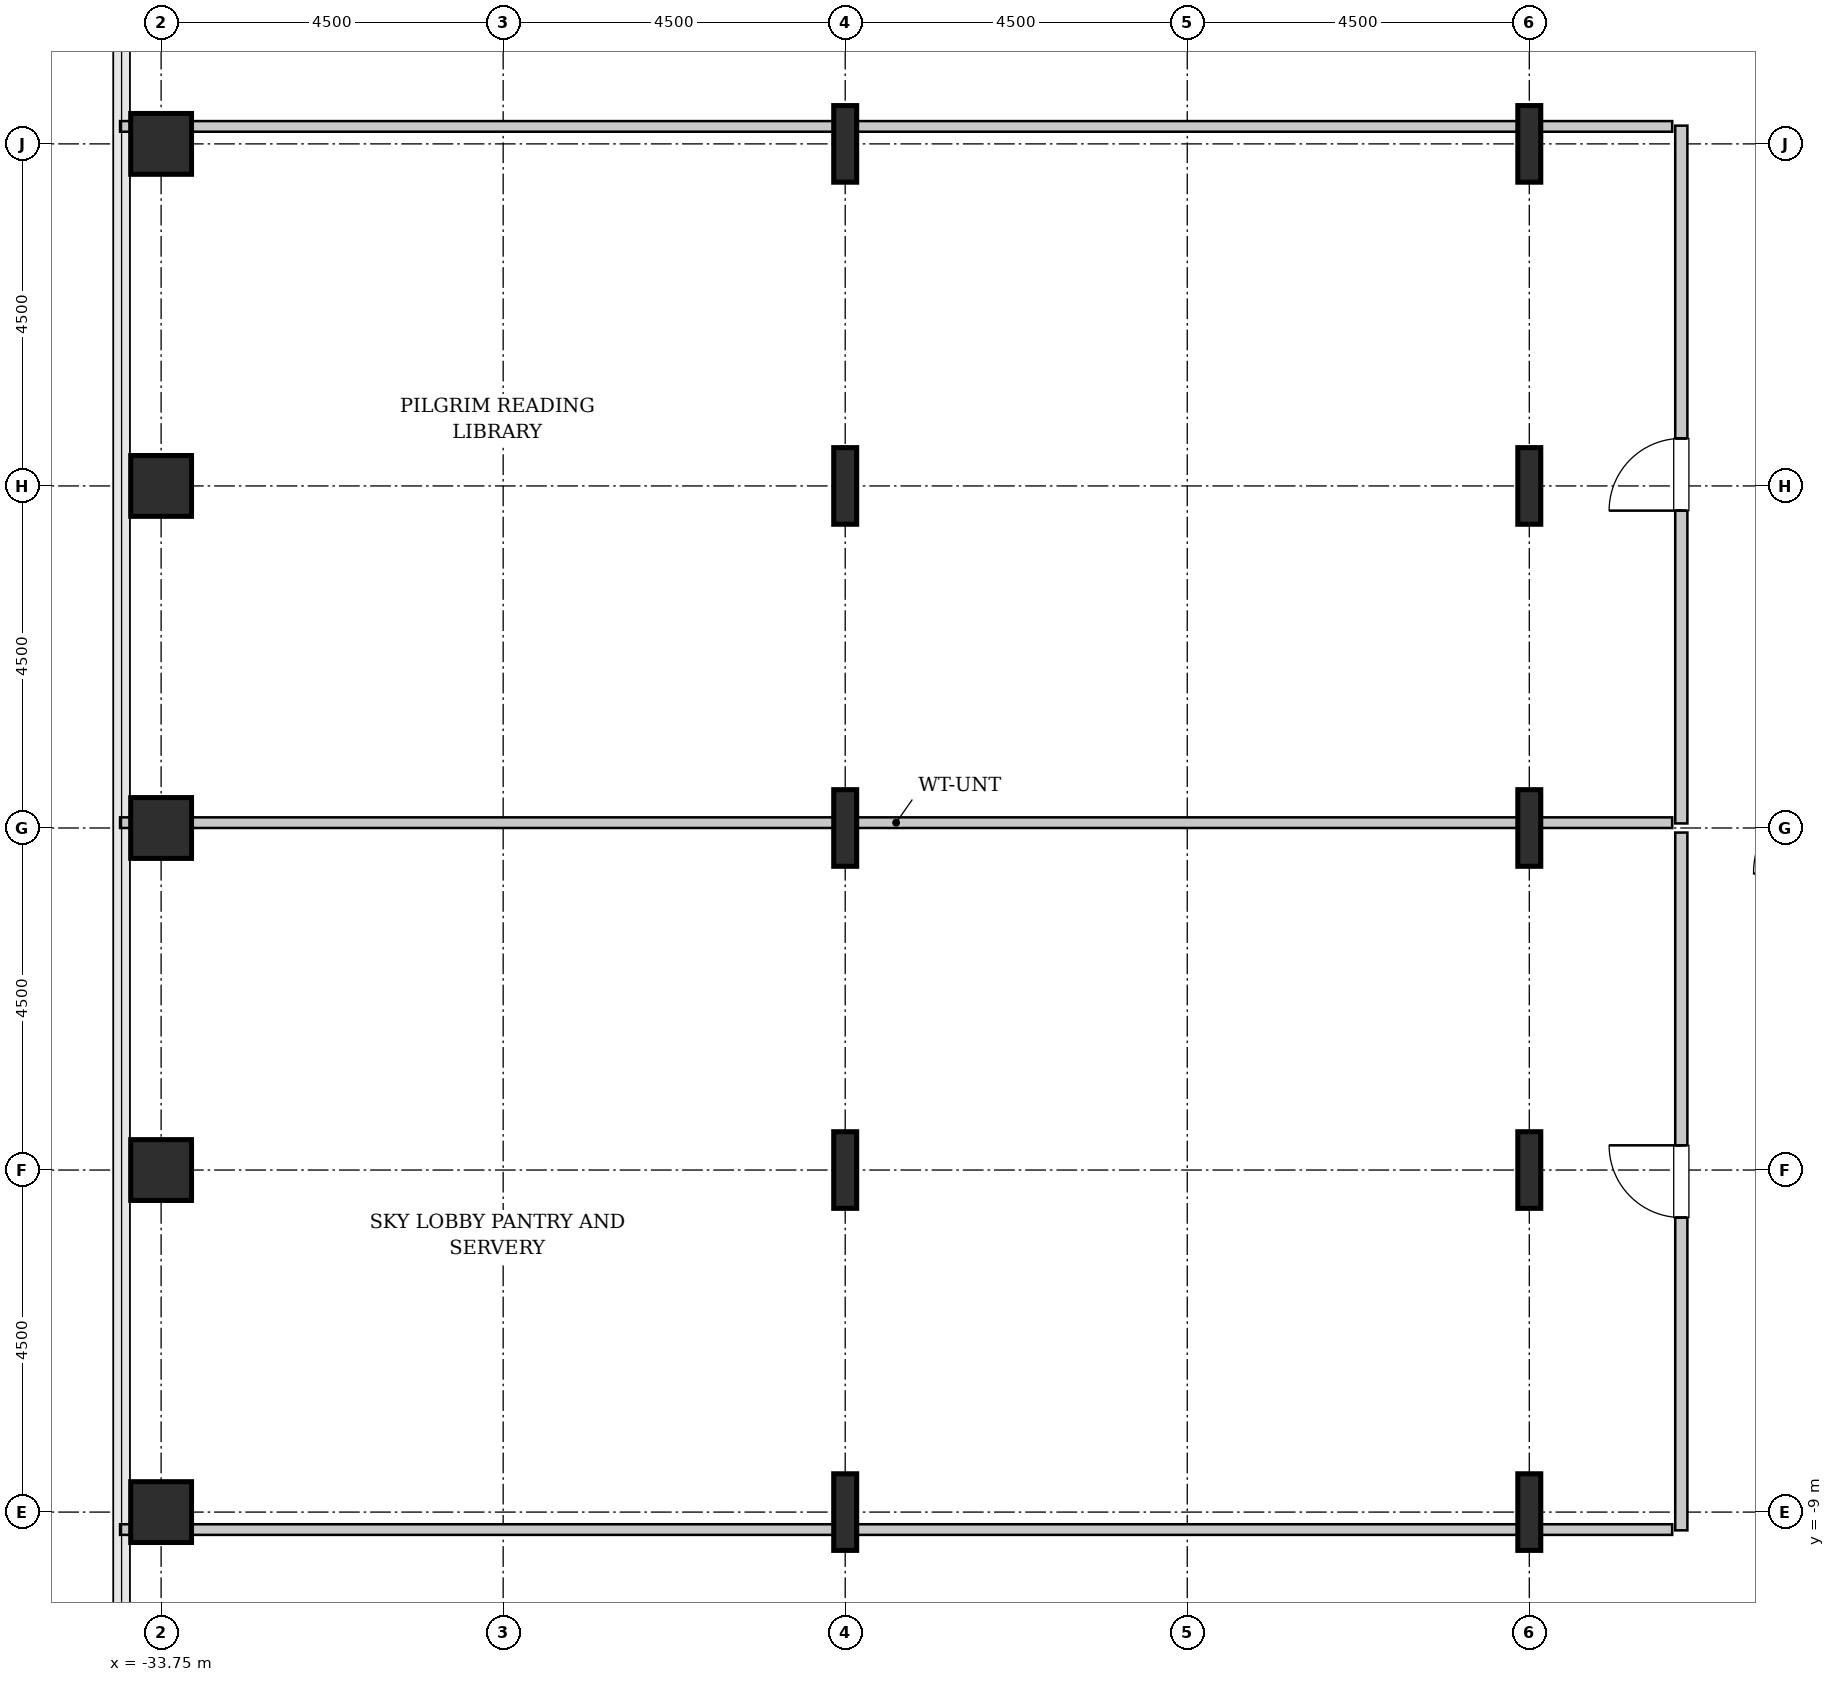
"""IFC4 building model, lengths in metres.
Left out: names, types, materials, properties, quantities, classifications, styles, units other than length and angle.
Written with IfcOpenShell. Run it as: python <this file> out.ifc"""

import sys

from ifc_helpers import new_model, si_unit, direction, frame, frame_2d, origin, origin_2d, place, context, subcontext, project, spatial, rectangle, hollow_rectangle, i_section, extrude, source, transform, mapped, element, fill, save


model = new_model("IFC4")
c1 = context("Model", 3, precision=1e-05, world=origin(), true_north=direction((0.0, 1.0)))
c2 = subcontext(c1, "Body", "Model", "MODEL_VIEW")
j1 = project(units=[si_unit("LENGTHUNIT", "METRE"), si_unit("PLANEANGLEUNIT", "RADIAN")], contexts=[c1])
p1 = place(None, origin())
s1 = spatial("IfcSite", under=j1, at=p1, CompositionType="ELEMENT")
p2 = place(p1, origin())
s2 = spatial("IfcBuilding", under=s1, at=p2, CompositionType="ELEMENT")
p3 = place(p2, frame((0.0, 0.0, 144.0)))
s3 = spatial("IfcBuildingStorey", under=s2, at=p3, CompositionType="ELEMENT", Elevation=144.0)
m1 = source(origin(), c2, "Body", "SweptSolid", [
    extrude(hollow_rectangle(XDim=0.8, YDim=0.8, WallThickness=0.04, InnerFilletRadius=0.04, OuterFilletRadius=0.08, at=origin_2d()), origin(), (0.0, 0.0, 1.0), 4.8),
])
for number, where, z_axis, x_axis in (
    (1, (-33.75, -9.0, 0.0), (0.0, 0.0, 1.0), (1.0, 0.0, 0.0)),
    (2, (-33.75, -4.5, 0.0), (0.0, 0.0, 1.0), (1.0, 0.0, 0.0)),
    (3, (-33.75, 0.0, 0.0), (0.0, 0.0, 1.0), (1.0, 0.0, 0.0)),
    (4, (-33.75, 4.5, 0.0), (0.0, 0.0, 1.0), (1.0, 0.0, 0.0)),
    (5, (-33.75, 9.0, 0.0), (0.0, 0.0, 1.0), (1.0, 0.0, 0.0)),
):
    element("IfcColumn", number, at=place(p3, frame(where, z_axis=z_axis, x_axis=x_axis)), inside=s3, PredefinedType="COLUMN", context=c2, shape_type="MappedRepresentation", body=[
        mapped(m1, transform((0.0, 0.0, 0.0), x_axis=(1.0, 0.0, 0.0), y_axis=(0.0, 1.0, 0.0), z_axis=(0.0, 0.0, 1.0), scale=1.0)),
    ])
m2 = source(origin(), c2, "Body", "SweptSolid", [
    extrude(i_section(OverallWidth=0.302, OverallDepth=1.008, WebThickness=0.021, FlangeThickness=0.04, FilletRadius=0.03, at=origin_2d()), origin(), (0.0, 0.0, 1.0), 4.8),
])
for number, where, z_axis, x_axis in (
    (6, (-24.75, -9.0, 0.0), (0.0, 0.0, 1.0), (1.0, 0.0, 0.0)),
    (7, (-24.75, -4.5, 0.0), (0.0, 0.0, 1.0), (1.0, 0.0, 0.0)),
    (8, (-24.75, 0.0, 0.0), (0.0, 0.0, 1.0), (1.0, 0.0, 0.0)),
    (9, (-24.75, 4.5, 0.0), (0.0, 0.0, 1.0), (1.0, 0.0, 0.0)),
    (10, (-24.75, 9.0, 0.0), (0.0, 0.0, 1.0), (1.0, 0.0, 0.0)),
    (11, (-15.75, -9.0, 0.0), (0.0, 0.0, 1.0), (1.0, 0.0, 0.0)),
    (12, (-15.75, -4.5, 0.0), (0.0, 0.0, 1.0), (1.0, 0.0, 0.0)),
    (13, (-15.75, 0.0, 0.0), (0.0, 0.0, 1.0), (1.0, 0.0, 0.0)),
    (14, (-15.75, 4.5, 0.0), (0.0, 0.0, 1.0), (1.0, 0.0, 0.0)),
    (15, (-15.75, 9.0, 0.0), (0.0, 0.0, 1.0), (1.0, 0.0, 0.0)),
):
    element("IfcColumn", number, at=place(p3, frame(where, z_axis=z_axis, x_axis=x_axis)), inside=s3, PredefinedType="COLUMN", context=c2, shape_type="MappedRepresentation", body=[
        mapped(m2, transform((0.0, 0.0, 0.0), x_axis=(1.0, 0.0, 0.0), y_axis=(0.0, 1.0, 0.0), z_axis=(0.0, 0.0, 1.0), scale=1.0)),
    ])
m3 = source(origin(), c2, "Body", "SweptSolid", [
    extrude(rectangle(XDim=9.18, YDim=0.16, at=frame_2d((4.59, 0.0))), origin(), (0.0, 0.0, 1.0), 4.535),
])
p4 = place(p3, frame((-13.75, 0.06, 0.0), z_axis=(0.0, 0.0, 1.0), x_axis=(0.0, 1.0, 0.0)))
e16 = element("IfcWall", 16, at=p4, inside=s3, PredefinedType="PARTITIONING", context=c2, shape_type="MappedRepresentation", body=[
    mapped(m3, transform((0.0, 0.0, 0.0), x_axis=(1.0, 0.0, 0.0), y_axis=(0.0, 1.0, 0.0), z_axis=(0.0, 0.0, 1.0), scale=1.0)),
])
p5 = place(p4, frame((4.115, 0.0, 0.0)))
e17 = element("IfcOpeningElement", 17, at=p5, cuts=e16, PredefinedType="OPENING", context=c2, shape_type="SweptSolid", body=[
    extrude(rectangle(XDim=0.95, YDim=2.1, at=frame_2d((0.475, 1.05))), frame((0.0, 0.09, 0.0), z_axis=(0.0, -1.0, 0.0), x_axis=(1.0, 0.0, 0.0)), (0.0, 0.0, 1.0), 0.18),
])
m4 = source(origin(), c2, "Body", "SweptSolid", [
    extrude(rectangle(XDim=20.42, YDim=0.14, at=frame_2d((10.21, 0.0))), origin(), (0.0, 0.0, 1.0), 3.875),
])
for number, where, z_axis, x_axis in (
    (18, (-34.29, 0.07, 0.0), (0.0, 0.0, 1.0), (1.0, 0.0, 0.0)),
    (19, (-34.29, 9.23, 0.0), (0.0, 0.0, 1.0), (1.0, 0.0, 0.0)),
):
    element("IfcWall", number, at=place(p3, frame(where, z_axis=z_axis, x_axis=x_axis)), inside=s3, PredefinedType="PARTITIONING", context=c2, shape_type="MappedRepresentation", body=[
        mapped(m4, transform((0.0, 0.0, 0.0), x_axis=(1.0, 0.0, 0.0), y_axis=(0.0, 1.0, 0.0), z_axis=(0.0, 0.0, 1.0), scale=1.0)),
    ])
p6 = place(p3, frame((-13.75, -9.24, 0.0), z_axis=(0.0, 0.0, 1.0), x_axis=(0.0, 1.0, 0.0)))
e20 = element("IfcWall", 20, at=p6, inside=s3, PredefinedType="PARTITIONING", context=c2, shape_type="MappedRepresentation", body=[
    mapped(m3, transform((0.0, 0.0, 0.0), x_axis=(1.0, 0.0, 0.0), y_axis=(0.0, 1.0, 0.0), z_axis=(0.0, 0.0, 1.0), scale=1.0)),
])
p7 = place(p6, frame((4.115, 0.0, 0.0)))
e21 = element("IfcOpeningElement", 21, at=p7, cuts=e20, PredefinedType="OPENING", context=c2, shape_type="SweptSolid", body=[
    extrude(rectangle(XDim=0.95, YDim=2.1, at=frame_2d((0.475, 1.05))), frame((0.0, 0.09, 0.0), z_axis=(0.0, -1.0, 0.0), x_axis=(1.0, 0.0, 0.0)), (0.0, 0.0, 1.0), 0.18),
])
p8 = place(p3, frame((-34.29, -9.23, 0.0), z_axis=(0.0, 0.0, 1.0), x_axis=(1.0, 0.0, 0.0)))
e22 = element("IfcWall", 22, at=p8, inside=s3, PredefinedType="PARTITIONING", context=c2, shape_type="MappedRepresentation", body=[
    mapped(m4, transform((0.0, 0.0, 0.0), x_axis=(1.0, 0.0, 0.0), y_axis=(0.0, 1.0, 0.0), z_axis=(0.0, 0.0, 1.0), scale=1.0)),
])
m5 = source(origin(), c2, "Body", "SweptSolid", [
    extrude(rectangle(XDim=0.95, YDim=2.1, at=frame_2d((0.475, 1.05))), frame((0.0, 0.025, 0.0), z_axis=(0.0, -1.0, 0.0), x_axis=(1.0, 0.0, 0.0)), (0.0, 0.0, 1.0), 0.05),
])
p9 = place(p5, origin())
e23 = element("IfcDoor", 23, at=p9, inside=s3, OperationType="SINGLE_SWING_LEFT", PredefinedType="DOOR", context=c2, shape_type="MappedRepresentation", body=[
    mapped(m5, transform((0.0, 0.0, 0.0), x_axis=(1.0, 0.0, 0.0), y_axis=(0.0, 1.0, 0.0), z_axis=(0.0, 0.0, 1.0), scale=1.0)),
])
fill(e17, e23)
p10 = place(p7, origin())
e24 = element("IfcDoor", 24, at=p10, inside=s3, OperationType="SINGLE_SWING_RIGHT", PredefinedType="DOOR", context=c2, shape_type="MappedRepresentation", body=[
    mapped(m5, transform((0.0, 0.0, 0.0), x_axis=(1.0, 0.0, 0.0), y_axis=(0.0, 1.0, 0.0), z_axis=(0.0, 0.0, 1.0), scale=1.0)),
])
fill(e21, e24)
save(model, sys.argv[1])
